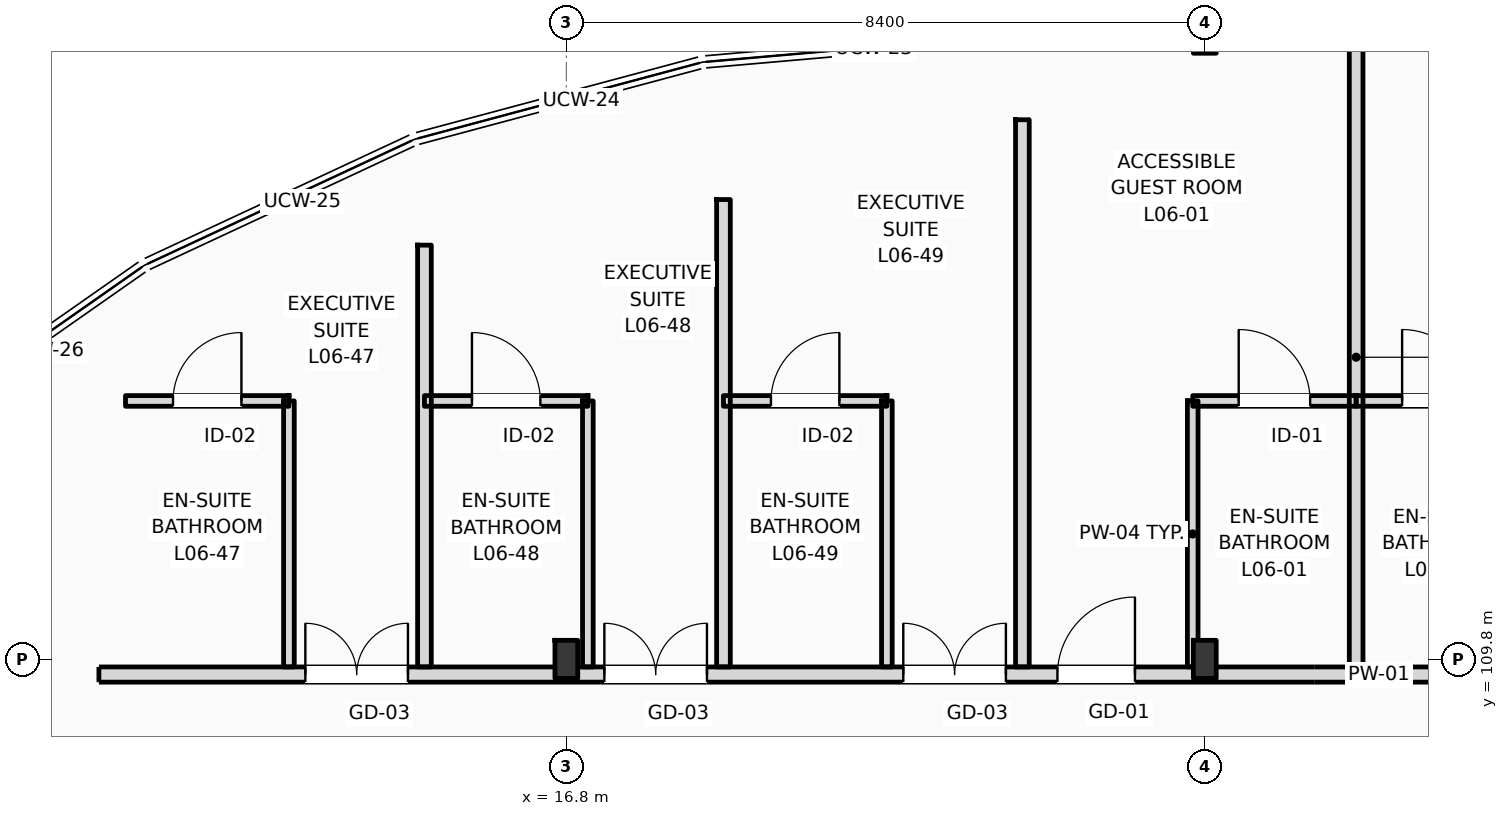
"""IFC4 building model, lengths in metres.
Left out: names, types, materials, properties, quantities, classifications, styles, units other than length and angle.
Written with IfcOpenShell. Run it as: python <this file> out.ifc"""

import sys

from ifc_helpers import new_model, si_unit, direction, frame, frame_2d, origin, origin_2d, place, context, subcontext, project, spatial, rectangle, i_section, extrude, element, fill, save


model = new_model("IFC4")
c1 = context("Model", 3, precision=1e-05, world=origin(), true_north=direction((0.0, 1.0)))
c2 = subcontext(c1, "Body", "Model", "MODEL_VIEW")
j1 = project(units=[si_unit("LENGTHUNIT", "METRE"), si_unit("PLANEANGLEUNIT", "RADIAN")], contexts=[c1])
p1 = place(None, origin())
s1 = spatial("IfcSite", under=j1, at=p1, CompositionType="ELEMENT")
p2 = place(p1, origin())
s2 = spatial("IfcBuilding", under=s1, at=p2, CompositionType="ELEMENT")
p3 = place(p2, frame((0.0, 0.0, 28.2)))
s3 = spatial("IfcBuildingStorey", under=s2, at=p3, CompositionType="ELEMENT", Elevation=28.2)
for number, where, z_axis, x_axis in (
    (1, (16.8, 109.8, 0.0), (0.0, 0.0, 1.0), (1.0, 0.0, 0.0)),
    (2, (25.2, 109.8, 0.0), (0.0, 0.0, 1.0), (1.0, 0.0, 0.0)),
):
    element("IfcColumn", number, at=place(p3, frame(where, z_axis=z_axis, x_axis=x_axis)), inside=s3, PredefinedType="COLUMN", context=c2, shape_type="SweptSolid", body=[
        extrude(i_section(OverallWidth=0.3, OverallDepth=0.5, WebThickness=0.014, FlangeThickness=0.028, FilletRadius=0.027, at=origin_2d()), origin(), (0.0, 0.0, 1.0), 3.6),
    ])
p4 = place(p3, frame((25.2, 118.0, 0.0), z_axis=(0.0, 0.0, 1.0), x_axis=(1.0, 0.0, 0.0)))
e3 = element("IfcColumn", 3, at=p4, inside=s3, PredefinedType="COLUMN", context=c2, shape_type="SweptSolid", body=[
    extrude(i_section(OverallWidth=0.3, OverallDepth=0.45, WebThickness=0.014, FlangeThickness=0.026, FilletRadius=0.027, at=origin_2d()), origin(), (0.0, 0.0, 1.0), 3.6),
])
p5 = place(p3, frame((10.65, 109.6, 0.0), z_axis=(0.0, 0.0, 1.0), x_axis=(1.0, 0.0, 0.0)))
e4 = element("IfcWall", 4, at=p5, inside=s3, PredefinedType="PARTITIONING", context=c2, shape_type="SweptSolid", body=[
    extrude(rectangle(XDim=109.21, YDim=0.2, at=frame_2d((54.605, 0.0))), origin(), (0.0, 0.0, 1.0), 2.8),
])
p6 = place(p5, frame((12.611, 0.0, 0.0)))
e5 = element("IfcOpeningElement", 5, at=p6, cuts=e4, PredefinedType="OPENING", context=c2, shape_type="SweptSolid", body=[
    extrude(rectangle(XDim=1.02, YDim=2.2, at=frame_2d((0.51, 1.1))), frame((0.0, 0.11, 0.0), z_axis=(0.0, -1.0, 0.0), x_axis=(1.0, 0.0, 0.0)), (0.0, 0.0, 1.0), 0.22),
])
p7 = place(p5, frame((19.451, 0.0, 0.0)))
e6 = element("IfcOpeningElement", 6, at=p7, cuts=e4, PredefinedType="OPENING", context=c2, shape_type="SweptSolid", body=[
    extrude(rectangle(XDim=1.02, YDim=2.2, at=frame_2d((0.51, 1.1))), frame((0.0, 0.11, 0.0), z_axis=(0.0, -1.0, 0.0), x_axis=(1.0, 0.0, 0.0)), (0.0, 0.0, 1.0), 0.22),
])
p8 = place(p5, frame((23.842, 0.0, 0.0)))
e7 = element("IfcOpeningElement", 7, at=p8, cuts=e4, PredefinedType="OPENING", context=c2, shape_type="SweptSolid", body=[
    extrude(rectangle(XDim=1.02, YDim=2.2, at=frame_2d((0.51, 1.1))), frame((0.0, 0.11, 0.0), z_axis=(0.0, -1.0, 0.0), x_axis=(1.0, 0.0, 0.0)), (0.0, 0.0, 1.0), 0.22),
])
p9 = place(p5, frame((26.084, 0.0, 0.0)))
e8 = element("IfcOpeningElement", 8, at=p9, cuts=e4, PredefinedType="OPENING", context=c2, shape_type="SweptSolid", body=[
    extrude(rectangle(XDim=1.02, YDim=2.2, at=frame_2d((0.51, 1.1))), frame((0.0, 0.11, 0.0), z_axis=(0.0, -1.0, 0.0), x_axis=(1.0, 0.0, 0.0)), (0.0, 0.0, 1.0), 0.22),
])
p10 = place(p5, frame((32.655, 0.0, 0.0)))
e9 = element("IfcOpeningElement", 9, at=p10, cuts=e4, PredefinedType="OPENING", context=c2, shape_type="SweptSolid", body=[
    extrude(rectangle(XDim=0.96, YDim=2.2, at=frame_2d((0.48, 1.1))), frame((0.0, 0.11, 0.0), z_axis=(0.0, -1.0, 0.0), x_axis=(1.0, 0.0, 0.0)), (0.0, 0.0, 1.0), 0.22),
])
p11 = place(p5, frame((34.895, 0.0, 0.0)))
e10 = element("IfcOpeningElement", 10, at=p11, cuts=e4, PredefinedType="OPENING", context=c2, shape_type="SweptSolid", body=[
    extrude(rectangle(XDim=0.96, YDim=2.2, at=frame_2d((0.48, 1.1))), frame((0.0, 0.11, 0.0), z_axis=(0.0, -1.0, 0.0), x_axis=(1.0, 0.0, 0.0)), (0.0, 0.0, 1.0), 0.22),
])
p12 = place(p5, frame((41.436, 0.0, 0.0)))
e11 = element("IfcOpeningElement", 11, at=p12, cuts=e4, PredefinedType="OPENING", context=c2, shape_type="SweptSolid", body=[
    extrude(rectangle(XDim=0.96, YDim=2.2, at=frame_2d((0.48, 1.1))), frame((0.0, 0.11, 0.0), z_axis=(0.0, -1.0, 0.0), x_axis=(1.0, 0.0, 0.0)), (0.0, 0.0, 1.0), 0.22),
])
p13 = place(p5, frame((43.427, 0.0, 0.0)))
e12 = element("IfcOpeningElement", 12, at=p13, cuts=e4, PredefinedType="OPENING", context=c2, shape_type="SweptSolid", body=[
    extrude(rectangle(XDim=0.96, YDim=2.2, at=frame_2d((0.48, 1.1))), frame((0.0, 0.11, 0.0), z_axis=(0.0, -1.0, 0.0), x_axis=(1.0, 0.0, 0.0)), (0.0, 0.0, 1.0), 0.22),
])
p14 = place(p5, frame((50.218, 0.0, 0.0)))
e13 = element("IfcOpeningElement", 13, at=p14, cuts=e4, PredefinedType="OPENING", context=c2, shape_type="SweptSolid", body=[
    extrude(rectangle(XDim=0.96, YDim=2.2, at=frame_2d((0.48, 1.1))), frame((0.0, 0.11, 0.0), z_axis=(0.0, -1.0, 0.0), x_axis=(1.0, 0.0, 0.0)), (0.0, 0.0, 1.0), 0.22),
])
p15 = place(p5, frame((54.859, 0.0, 0.0)))
e14 = element("IfcOpeningElement", 14, at=p15, cuts=e4, PredefinedType="OPENING", context=c2, shape_type="SweptSolid", body=[
    extrude(rectangle(XDim=0.96, YDim=2.2, at=frame_2d((0.48, 1.1))), frame((0.0, 0.11, 0.0), z_axis=(0.0, -1.0, 0.0), x_axis=(1.0, 0.0, 0.0)), (0.0, 0.0, 1.0), 0.22),
])
p16 = place(p5, frame((59.0, 0.0, 0.0)))
e15 = element("IfcOpeningElement", 15, at=p16, cuts=e4, PredefinedType="OPENING", context=c2, shape_type="SweptSolid", body=[
    extrude(rectangle(XDim=0.96, YDim=2.2, at=frame_2d((0.48, 1.1))), frame((0.0, 0.11, 0.0), z_axis=(0.0, -1.0, 0.0), x_axis=(1.0, 0.0, 0.0)), (0.0, 0.0, 1.0), 0.22),
])
p17 = place(p5, frame((63.39, 0.0, 0.0)))
e16 = element("IfcOpeningElement", 16, at=p17, cuts=e4, PredefinedType="OPENING", context=c2, shape_type="SweptSolid", body=[
    extrude(rectangle(XDim=0.96, YDim=2.2, at=frame_2d((0.48, 1.1))), frame((0.0, 0.11, 0.0), z_axis=(0.0, -1.0, 0.0), x_axis=(1.0, 0.0, 0.0)), (0.0, 0.0, 1.0), 0.22),
])
p18 = place(p5, frame((65.631, 0.0, 0.0)))
e17 = element("IfcOpeningElement", 17, at=p18, cuts=e4, PredefinedType="OPENING", context=c2, shape_type="SweptSolid", body=[
    extrude(rectangle(XDim=0.96, YDim=2.2, at=frame_2d((0.48, 1.1))), frame((0.0, 0.11, 0.0), z_axis=(0.0, -1.0, 0.0), x_axis=(1.0, 0.0, 0.0)), (0.0, 0.0, 1.0), 0.22),
])
p19 = place(p5, frame((72.172, 0.0, 0.0)))
e18 = element("IfcOpeningElement", 18, at=p19, cuts=e4, PredefinedType="OPENING", context=c2, shape_type="SweptSolid", body=[
    extrude(rectangle(XDim=0.96, YDim=2.2, at=frame_2d((0.48, 1.1))), frame((0.0, 0.11, 0.0), z_axis=(0.0, -1.0, 0.0), x_axis=(1.0, 0.0, 0.0)), (0.0, 0.0, 1.0), 0.22),
])
p20 = place(p5, frame((74.413, 0.0, 0.0)))
e19 = element("IfcOpeningElement", 19, at=p20, cuts=e4, PredefinedType="OPENING", context=c2, shape_type="SweptSolid", body=[
    extrude(rectangle(XDim=0.96, YDim=2.2, at=frame_2d((0.48, 1.1))), frame((0.0, 0.11, 0.0), z_axis=(0.0, -1.0, 0.0), x_axis=(1.0, 0.0, 0.0)), (0.0, 0.0, 1.0), 0.22),
])
p21 = place(p5, frame((80.954, 0.0, 0.0)))
e20 = element("IfcOpeningElement", 20, at=p21, cuts=e4, PredefinedType="OPENING", context=c2, shape_type="SweptSolid", body=[
    extrude(rectangle(XDim=0.96, YDim=2.2, at=frame_2d((0.48, 1.1))), frame((0.0, 0.11, 0.0), z_axis=(0.0, -1.0, 0.0), x_axis=(1.0, 0.0, 0.0)), (0.0, 0.0, 1.0), 0.22),
])
p22 = place(p5, frame((83.195, 0.0, 0.0)))
e21 = element("IfcOpeningElement", 21, at=p22, cuts=e4, PredefinedType="OPENING", context=c2, shape_type="SweptSolid", body=[
    extrude(rectangle(XDim=0.96, YDim=2.2, at=frame_2d((0.48, 1.1))), frame((0.0, 0.11, 0.0), z_axis=(0.0, -1.0, 0.0), x_axis=(1.0, 0.0, 0.0)), (0.0, 0.0, 1.0), 0.22),
])
p23 = place(p5, frame((89.735, 0.0, 0.0)))
e22 = element("IfcOpeningElement", 22, at=p23, cuts=e4, PredefinedType="OPENING", context=c2, shape_type="SweptSolid", body=[
    extrude(rectangle(XDim=0.96, YDim=2.2, at=frame_2d((0.48, 1.1))), frame((0.0, 0.11, 0.0), z_axis=(0.0, -1.0, 0.0), x_axis=(1.0, 0.0, 0.0)), (0.0, 0.0, 1.0), 0.22),
])
p24 = place(p5, frame((94.126, 0.0, 0.0)))
e23 = element("IfcOpeningElement", 23, at=p24, cuts=e4, PredefinedType="OPENING", context=c2, shape_type="SweptSolid", body=[
    extrude(rectangle(XDim=0.96, YDim=2.2, at=frame_2d((0.48, 1.1))), frame((0.0, 0.11, 0.0), z_axis=(0.0, -1.0, 0.0), x_axis=(1.0, 0.0, 0.0)), (0.0, 0.0, 1.0), 0.22),
])
p25 = place(p5, frame((98.517, 0.0, 0.0)))
e24 = element("IfcOpeningElement", 24, at=p25, cuts=e4, PredefinedType="OPENING", context=c2, shape_type="SweptSolid", body=[
    extrude(rectangle(XDim=0.96, YDim=2.2, at=frame_2d((0.48, 1.1))), frame((0.0, 0.11, 0.0), z_axis=(0.0, -1.0, 0.0), x_axis=(1.0, 0.0, 0.0)), (0.0, 0.0, 1.0), 0.22),
])
p26 = place(p5, frame((102.908, 0.0, 0.0)))
e25 = element("IfcOpeningElement", 25, at=p26, cuts=e4, PredefinedType="OPENING", context=c2, shape_type="SweptSolid", body=[
    extrude(rectangle(XDim=0.96, YDim=2.2, at=frame_2d((0.48, 1.1))), frame((0.0, 0.11, 0.0), z_axis=(0.0, -1.0, 0.0), x_axis=(1.0, 0.0, 0.0)), (0.0, 0.0, 1.0), 0.22),
])
p27 = place(p5, frame((105.099, 0.0, 0.0)))
e26 = element("IfcOpeningElement", 26, at=p27, cuts=e4, PredefinedType="OPENING", context=c2, shape_type="SweptSolid", body=[
    extrude(rectangle(XDim=0.96, YDim=2.2, at=frame_2d((0.48, 1.1))), frame((0.0, 0.11, 0.0), z_axis=(0.0, -1.0, 0.0), x_axis=(1.0, 0.0, 0.0)), (0.0, 0.0, 1.0), 0.22),
])
p28 = place(p5, frame((2.716, 0.0, 0.0)))
e27 = element("IfcOpeningElement", 27, at=p28, cuts=e4, PredefinedType="OPENING", context=c2, shape_type="SweptSolid", body=[
    extrude(rectangle(XDim=1.35, YDim=2.25, at=frame_2d((0.675, 1.125))), frame((0.0, 0.11, 0.0), z_axis=(0.0, -1.0, 0.0), x_axis=(1.0, 0.0, 0.0)), (0.0, 0.0, 1.0), 0.22),
])
p29 = place(p5, frame((6.65, 0.0, 0.0)))
e28 = element("IfcOpeningElement", 28, at=p29, cuts=e4, PredefinedType="OPENING", context=c2, shape_type="SweptSolid", body=[
    extrude(rectangle(XDim=1.35, YDim=2.25, at=frame_2d((0.675, 1.125))), frame((0.0, 0.11, 0.0), z_axis=(0.0, -1.0, 0.0), x_axis=(1.0, 0.0, 0.0)), (0.0, 0.0, 1.0), 0.22),
])
p30 = place(p5, frame((10.583, 0.0, 0.0)))
e29 = element("IfcOpeningElement", 29, at=p30, cuts=e4, PredefinedType="OPENING", context=c2, shape_type="SweptSolid", body=[
    extrude(rectangle(XDim=1.35, YDim=2.25, at=frame_2d((0.675, 1.125))), frame((0.0, 0.11, 0.0), z_axis=(0.0, -1.0, 0.0), x_axis=(1.0, 0.0, 0.0)), (0.0, 0.0, 1.0), 0.22),
])
p31 = place(p3, frame((27.191, 109.7, 0.0), z_axis=(0.0, 0.0, 1.0), x_axis=(0.0, 1.0, 0.0)))
e30 = element("IfcWall", 30, at=p31, inside=s3, PredefinedType="PARTITIONING", context=c2, shape_type="SweptSolid", body=[
    extrude(rectangle(XDim=8.15, YDim=0.18, at=frame_2d((4.075, 0.0))), origin(), (0.0, 0.0, 1.0), 3.36),
])
p32 = place(p3, frame((25.041, 109.7, 0.0), z_axis=(0.0, 0.0, 1.0), x_axis=(0.0, 1.0, 0.0)))
e31 = element("IfcWall", 31, at=p32, inside=s3, PredefinedType="PARTITIONING", context=c2, shape_type="SweptSolid", body=[
    extrude(rectangle(XDim=3.5, YDim=0.14, at=frame_2d((1.75, 0.0))), origin(), (0.0, 0.0, 1.0), 2.99),
])
p33 = place(p3, frame((25.041, 113.2, 0.0), z_axis=(0.0, 0.0, 1.0), x_axis=(1.0, 0.0, 0.0)))
e32 = element("IfcWall", 32, at=p33, inside=s3, PredefinedType="PARTITIONING", context=c2, shape_type="SweptSolid", body=[
    extrude(rectangle(XDim=2.15, YDim=0.14, at=frame_2d((1.075, 0.0))), origin(), (0.0, 0.0, 1.0), 3.36),
])
p34 = place(p33, frame((0.605, 0.0, 0.0)))
e33 = element("IfcOpeningElement", 33, at=p34, cuts=e32, PredefinedType="OPENING", context=c2, shape_type="SweptSolid", body=[
    extrude(rectangle(XDim=0.94, YDim=2.15, at=frame_2d((0.47, 1.075))), frame((0.0, 0.08, 0.0), z_axis=(0.0, -1.0, 0.0), x_axis=(1.0, 0.0, 0.0)), (0.0, 0.0, 1.0), 0.16),
])
p35 = place(p3, frame((27.191, 113.2, 0.0), z_axis=(0.0, 0.0, 1.0), x_axis=(1.0, 0.0, 0.0)))
e34 = element("IfcWall", 34, at=p35, inside=s3, PredefinedType="PARTITIONING", context=c2, shape_type="SweptSolid", body=[
    extrude(rectangle(XDim=2.15, YDim=0.14, at=frame_2d((1.075, 0.0))), origin(), (0.0, 0.0, 1.0), 3.36),
])
p36 = place(p35, frame((0.605, 0.0, 0.0)))
e35 = element("IfcOpeningElement", 35, at=p36, cuts=e34, PredefinedType="OPENING", context=c2, shape_type="SweptSolid", body=[
    extrude(rectangle(XDim=0.94, YDim=2.15, at=frame_2d((0.47, 1.075))), frame((0.0, 0.08, 0.0), z_axis=(0.0, -1.0, 0.0), x_axis=(1.0, 0.0, 0.0)), (0.0, 0.0, 1.0), 0.16),
])
p37 = place(p3, frame((14.933, 109.7, 0.0), z_axis=(0.0, 0.0, 1.0), x_axis=(0.0, 1.0, 0.0)))
e36 = element("IfcWall", 36, at=p37, inside=s3, PredefinedType="PARTITIONING", context=c2, shape_type="SweptSolid", body=[
    extrude(rectangle(XDim=5.55, YDim=0.18, at=frame_2d((2.775, 0.0))), origin(), (0.0, 0.0, 1.0), 3.36),
])
p38 = place(p3, frame((13.15, 109.7, 0.0), z_axis=(0.0, 0.0, 1.0), x_axis=(0.0, 1.0, 0.0)))
e37 = element("IfcWall", 37, at=p38, inside=s3, PredefinedType="PARTITIONING", context=c2, shape_type="SweptSolid", body=[
    extrude(rectangle(XDim=3.5, YDim=0.14, at=frame_2d((1.75, 0.0))), origin(), (0.0, 0.0, 1.0), 3.36),
])
p39 = place(p3, frame((11.0, 113.2, 0.0), z_axis=(0.0, 0.0, 1.0), x_axis=(1.0, 0.0, 0.0)))
e38 = element("IfcWall", 38, at=p39, inside=s3, PredefinedType="PARTITIONING", context=c2, shape_type="SweptSolid", body=[
    extrude(rectangle(XDim=2.15, YDim=0.14, at=frame_2d((1.075, 0.0))), origin(), (0.0, 0.0, 1.0), 3.36),
])
p40 = place(p39, frame((0.625, 0.0, 0.0)))
e39 = element("IfcOpeningElement", 39, at=p40, cuts=e38, PredefinedType="OPENING", context=c2, shape_type="SweptSolid", body=[
    extrude(rectangle(XDim=0.9, YDim=2.1, at=frame_2d((0.45, 1.05))), frame((0.0, 0.08, 0.0), z_axis=(0.0, -1.0, 0.0), x_axis=(1.0, 0.0, 0.0)), (0.0, 0.0, 1.0), 0.16),
])
p41 = place(p3, frame((18.867, 109.7, 0.0), z_axis=(0.0, 0.0, 1.0), x_axis=(0.0, 1.0, 0.0)))
e40 = element("IfcWall", 40, at=p41, inside=s3, PredefinedType="PARTITIONING", context=c2, shape_type="SweptSolid", body=[
    extrude(rectangle(XDim=6.15, YDim=0.18, at=frame_2d((3.075, 0.0))), origin(), (0.0, 0.0, 1.0), 3.36),
])
p42 = place(p3, frame((17.083, 109.7, 0.0), z_axis=(0.0, 0.0, 1.0), x_axis=(0.0, 1.0, 0.0)))
e41 = element("IfcWall", 41, at=p42, inside=s3, PredefinedType="PARTITIONING", context=c2, shape_type="SweptSolid", body=[
    extrude(rectangle(XDim=3.5, YDim=0.14, at=frame_2d((1.75, 0.0))), origin(), (0.0, 0.0, 1.0), 3.36),
])
p43 = place(p3, frame((14.933, 113.2, 0.0), z_axis=(0.0, 0.0, 1.0), x_axis=(1.0, 0.0, 0.0)))
e42 = element("IfcWall", 42, at=p43, inside=s3, PredefinedType="PARTITIONING", context=c2, shape_type="SweptSolid", body=[
    extrude(rectangle(XDim=2.15, YDim=0.14, at=frame_2d((1.075, 0.0))), origin(), (0.0, 0.0, 1.0), 3.36),
])
p44 = place(p43, frame((0.625, 0.0, 0.0)))
e43 = element("IfcOpeningElement", 43, at=p44, cuts=e42, PredefinedType="OPENING", context=c2, shape_type="SweptSolid", body=[
    extrude(rectangle(XDim=0.9, YDim=2.1, at=frame_2d((0.45, 1.05))), frame((0.0, 0.08, 0.0), z_axis=(0.0, -1.0, 0.0), x_axis=(1.0, 0.0, 0.0)), (0.0, 0.0, 1.0), 0.16),
])
p45 = place(p3, frame((22.8, 109.7, 0.0), z_axis=(0.0, 0.0, 1.0), x_axis=(0.0, 1.0, 0.0)))
e44 = element("IfcWall", 44, at=p45, inside=s3, PredefinedType="PARTITIONING", context=c2, shape_type="SweptSolid", body=[
    extrude(rectangle(XDim=7.2, YDim=0.18, at=frame_2d((3.6, 0.0))), origin(), (0.0, 0.0, 1.0), 3.36),
])
p46 = place(p3, frame((21.017, 109.7, 0.0), z_axis=(0.0, 0.0, 1.0), x_axis=(0.0, 1.0, 0.0)))
e45 = element("IfcWall", 45, at=p46, inside=s3, PredefinedType="PARTITIONING", context=c2, shape_type="SweptSolid", body=[
    extrude(rectangle(XDim=3.5, YDim=0.14, at=frame_2d((1.75, 0.0))), origin(), (0.0, 0.0, 1.0), 3.36),
])
p47 = place(p3, frame((18.867, 113.2, 0.0), z_axis=(0.0, 0.0, 1.0), x_axis=(1.0, 0.0, 0.0)))
e46 = element("IfcWall", 46, at=p47, inside=s3, PredefinedType="PARTITIONING", context=c2, shape_type="SweptSolid", body=[
    extrude(rectangle(XDim=2.15, YDim=0.14, at=frame_2d((1.075, 0.0))), origin(), (0.0, 0.0, 1.0), 3.36),
])
p48 = place(p47, frame((0.625, 0.0, 0.0)))
e47 = element("IfcOpeningElement", 47, at=p48, cuts=e46, PredefinedType="OPENING", context=c2, shape_type="SweptSolid", body=[
    extrude(rectangle(XDim=0.9, YDim=2.1, at=frame_2d((0.45, 1.05))), frame((0.0, 0.08, 0.0), z_axis=(0.0, -1.0, 0.0), x_axis=(1.0, 0.0, 0.0)), (0.0, 0.0, 1.0), 0.16),
])
p49 = place(p6, origin())
e48 = element("IfcDoor", 48, at=p49, inside=s3, OperationType="SINGLE_SWING_RIGHT", PredefinedType="DOOR", context=c2, shape_type="SweptSolid", body=[
    extrude(rectangle(XDim=1.02, YDim=2.2, at=frame_2d((0.51, 1.1))), frame((0.0, 0.025, 0.0), z_axis=(0.0, -1.0, 0.0), x_axis=(1.0, 0.0, 0.0)), (0.0, 0.0, 1.0), 0.05),
])
fill(e5, e48)
p50 = place(p34, origin())
e49 = element("IfcDoor", 49, at=p50, inside=s3, OperationType="SINGLE_SWING_LEFT", PredefinedType="DOOR", context=c2, shape_type="SweptSolid", body=[
    extrude(rectangle(XDim=0.94, YDim=2.15, at=frame_2d((0.47, 1.075))), frame((0.0, 0.025, 0.0), z_axis=(0.0, -1.0, 0.0), x_axis=(1.0, 0.0, 0.0)), (0.0, 0.0, 1.0), 0.05),
])
fill(e33, e49)
p51 = place(p36, origin())
e50 = element("IfcDoor", 50, at=p51, inside=s3, OperationType="SINGLE_SWING_LEFT", PredefinedType="DOOR", context=c2, shape_type="SweptSolid", body=[
    extrude(rectangle(XDim=0.94, YDim=2.15, at=frame_2d((0.47, 1.075))), frame((0.0, 0.025, 0.0), z_axis=(0.0, -1.0, 0.0), x_axis=(1.0, 0.0, 0.0)), (0.0, 0.0, 1.0), 0.05),
])
fill(e35, e50)
p52 = place(p28, origin())
e51 = element("IfcDoor", 51, at=p52, inside=s3, OperationType="DOUBLE_SWING_LEFT", PredefinedType="DOOR", context=c2, shape_type="SweptSolid", body=[
    extrude(rectangle(XDim=1.35, YDim=2.25, at=frame_2d((0.675, 1.125))), frame((0.0, 0.025, 0.0), z_axis=(0.0, -1.0, 0.0), x_axis=(1.0, 0.0, 0.0)), (0.0, 0.0, 1.0), 0.05),
])
fill(e27, e51)
p53 = place(p40, origin())
e52 = element("IfcDoor", 52, at=p53, inside=s3, OperationType="SINGLE_SWING_RIGHT", PredefinedType="DOOR", context=c2, shape_type="SweptSolid", body=[
    extrude(rectangle(XDim=0.9, YDim=2.1, at=frame_2d((0.45, 1.05))), frame((0.0, 0.025, 0.0), z_axis=(0.0, -1.0, 0.0), x_axis=(1.0, 0.0, 0.0)), (0.0, 0.0, 1.0), 0.05),
])
fill(e39, e52)
p54 = place(p29, origin())
e53 = element("IfcDoor", 53, at=p54, inside=s3, OperationType="DOUBLE_SWING_LEFT", PredefinedType="DOOR", context=c2, shape_type="SweptSolid", body=[
    extrude(rectangle(XDim=1.35, YDim=2.25, at=frame_2d((0.675, 1.125))), frame((0.0, 0.025, 0.0), z_axis=(0.0, -1.0, 0.0), x_axis=(1.0, 0.0, 0.0)), (0.0, 0.0, 1.0), 0.05),
])
fill(e28, e53)
p55 = place(p44, origin())
e54 = element("IfcDoor", 54, at=p55, inside=s3, OperationType="SINGLE_SWING_LEFT", PredefinedType="DOOR", context=c2, shape_type="SweptSolid", body=[
    extrude(rectangle(XDim=0.9, YDim=2.1, at=frame_2d((0.45, 1.05))), frame((0.0, 0.025, 0.0), z_axis=(0.0, -1.0, 0.0), x_axis=(1.0, 0.0, 0.0)), (0.0, 0.0, 1.0), 0.05),
])
fill(e43, e54)
p56 = place(p30, origin())
e55 = element("IfcDoor", 55, at=p56, inside=s3, OperationType="DOUBLE_SWING_LEFT", PredefinedType="DOOR", context=c2, shape_type="SweptSolid", body=[
    extrude(rectangle(XDim=1.35, YDim=2.25, at=frame_2d((0.675, 1.125))), frame((0.0, 0.025, 0.0), z_axis=(0.0, -1.0, 0.0), x_axis=(1.0, 0.0, 0.0)), (0.0, 0.0, 1.0), 0.05),
])
fill(e29, e55)
p57 = place(p48, origin())
e56 = element("IfcDoor", 56, at=p57, inside=s3, OperationType="SINGLE_SWING_RIGHT", PredefinedType="DOOR", context=c2, shape_type="SweptSolid", body=[
    extrude(rectangle(XDim=0.9, YDim=2.1, at=frame_2d((0.45, 1.05))), frame((0.0, 0.025, 0.0), z_axis=(0.0, -1.0, 0.0), x_axis=(1.0, 0.0, 0.0)), (0.0, 0.0, 1.0), 0.05),
])
fill(e47, e56)
save(model, sys.argv[1])
